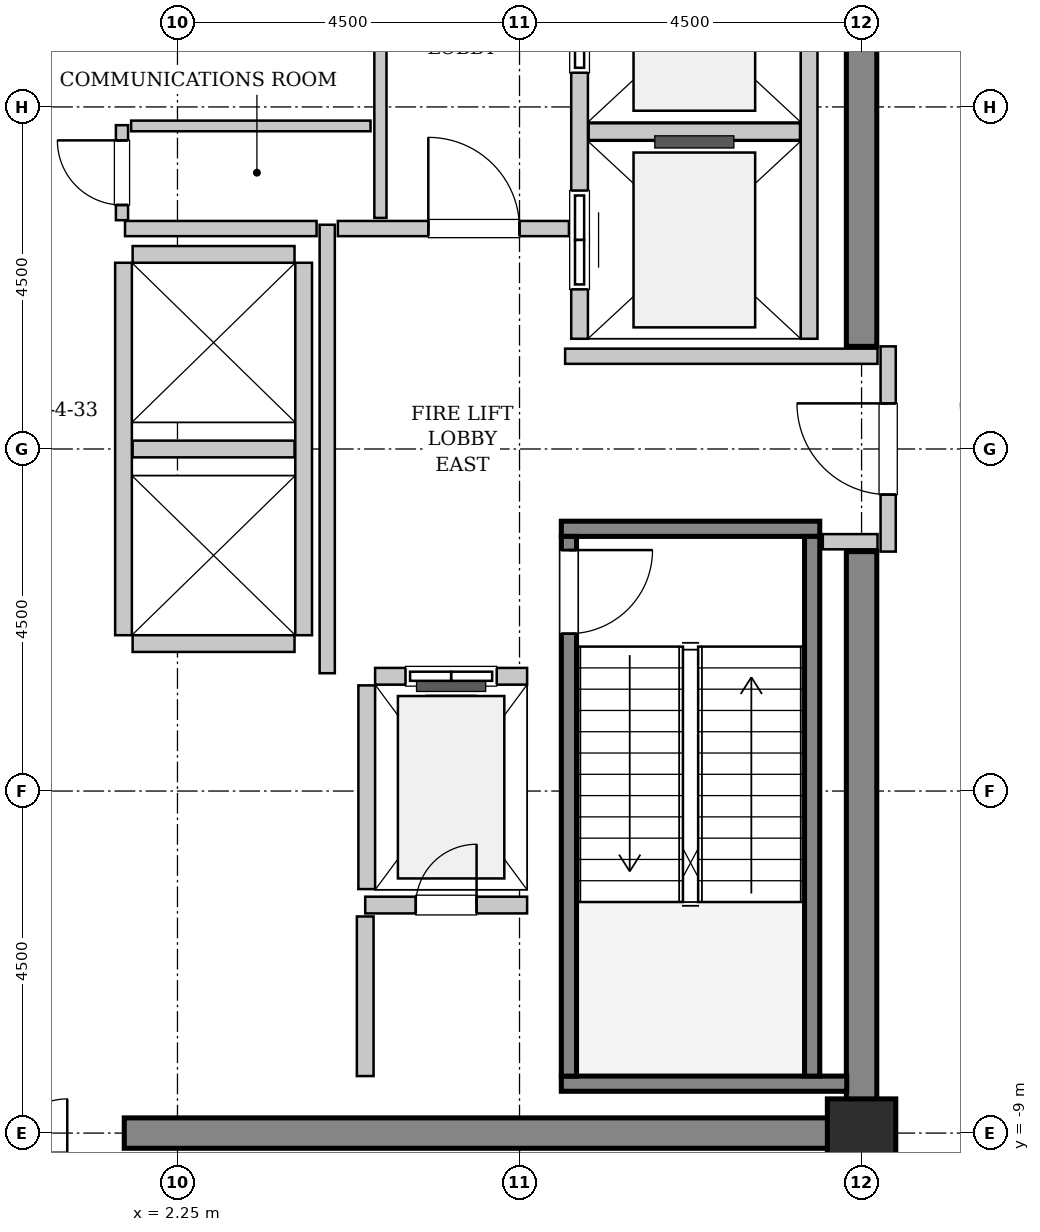
"""IFC4 building model, lengths in metres.
Left out: names, types, materials, properties, quantities, classifications, styles, units other than length and angle.
Written with IfcOpenShell. Run it as: python <this file> out.ifc"""

import sys

from ifc_helpers import new_model, si_unit, direction, frame, frame_2d, origin, origin_2d, place, context, subcontext, project, spatial, rectangle, extrude, source, transform, mapped, element, fill, save


model = new_model("IFC4")
c1 = context("Model", 3, precision=1e-05, world=origin(), true_north=direction((0.0, 1.0)))
c2 = subcontext(c1, "Body", "Model", "MODEL_VIEW")
j1 = project(units=[si_unit("LENGTHUNIT", "METRE"), si_unit("PLANEANGLEUNIT", "RADIAN")], contexts=[c1])
p1 = place(None, origin())
s1 = spatial("IfcSite", under=j1, at=p1, CompositionType="ELEMENT")
p2 = place(p1, origin())
s2 = spatial("IfcBuilding", under=s1, at=p2, CompositionType="ELEMENT")
p3 = place(p2, frame((0.0, 0.0, 358.6)))
s3 = spatial("IfcBuildingStorey", under=s2, at=p3, CompositionType="ELEMENT", Elevation=358.6)
m1 = source(origin(), c2, "Body", "SweptSolid", [
    extrude(rectangle(XDim=9.9, YDim=0.4, at=frame_2d((4.95, 0.0))), origin(), (0.0, 0.0, 1.0), 4.4),
])
p4 = place(p3, frame((1.55, -9.0, 0.0), z_axis=(0.0, 0.0, 1.0), x_axis=(1.0, 0.0, 0.0)))
e1 = element("IfcWall", 1, at=p4, inside=s3, PredefinedType="SHEAR", context=c2, shape_type="MappedRepresentation", body=[
    mapped(m1, transform((0.0, 0.0, 0.0), x_axis=(1.0, 0.0, 0.0), y_axis=(0.0, 1.0, 0.0), z_axis=(0.0, 0.0, 1.0), scale=1.0)),
])
m2 = source(origin(), c2, "Body", "SweptSolid", [
    extrude(rectangle(XDim=7.45, YDim=0.4, at=frame_2d((3.725, 0.0))), origin(), (0.0, 0.0, 1.0), 4.4),
])
for number, where, z_axis, x_axis in (
    (2, (11.25, -8.8, 0.0), (0.0, 0.0, 1.0), (0.0, 1.0, 0.0)),
    (3, (11.25, 1.35, 0.0), (0.0, 0.0, 1.0), (0.0, 1.0, 0.0)),
):
    element("IfcWall", number, at=place(p3, frame(where, z_axis=z_axis, x_axis=x_axis)), inside=s3, PredefinedType="SHEAR", context=c2, shape_type="MappedRepresentation", body=[
        mapped(m2, transform((0.0, 0.0, 0.0), x_axis=(1.0, 0.0, 0.0), y_axis=(0.0, 1.0, 0.0), z_axis=(0.0, 0.0, 1.0), scale=1.0)),
    ])
m3 = source(origin(), c2, "Body", "SweptSolid", [
    extrude(rectangle(XDim=0.9, YDim=0.9, at=origin_2d()), origin(), (0.0, 0.0, 1.0), 4.4),
])
p5 = place(p3, frame((11.25, -9.0, 0.0), z_axis=(0.0, 0.0, 1.0), x_axis=(1.0, 0.0, 0.0)))
e4 = element("IfcColumn", 4, at=p5, inside=s3, PredefinedType="COLUMN", context=c2, shape_type="MappedRepresentation", body=[
    mapped(m3, transform((0.0, 0.0, 0.0), x_axis=(1.0, 0.0, 0.0), y_axis=(0.0, 1.0, 0.0), z_axis=(0.0, 0.0, 1.0), scale=1.0)),
])
m4 = source(origin(), c2, "Body", "SweptSolid", [
    extrude(rectangle(XDim=3.4, YDim=0.2, at=frame_2d((1.7, 0.0))), origin(), (0.0, 0.0, 1.0), 4.4),
])
p6 = place(p3, frame((7.3, -1.05, 0.0), z_axis=(0.0, 0.0, 1.0), x_axis=(1.0, 0.0, 0.0)))
e5 = element("IfcWall", 5, at=p6, inside=s3, PredefinedType="SOLIDWALL", context=c2, shape_type="MappedRepresentation", body=[
    mapped(m4, transform((0.0, 0.0, 0.0), x_axis=(1.0, 0.0, 0.0), y_axis=(0.0, 1.0, 0.0), z_axis=(0.0, 0.0, 1.0), scale=1.0)),
])
m5 = source(origin(), c2, "Body", "SweptSolid", [
    extrude(rectangle(XDim=3.755, YDim=0.2, at=frame_2d((1.877, 0.0))), origin(), (0.0, 0.0, 1.0), 4.4),
])
p7 = place(p3, frame((7.3, -8.35, 0.0), z_axis=(0.0, 0.0, 1.0), x_axis=(1.0, 0.0, 0.0)))
e6 = element("IfcWall", 6, at=p7, inside=s3, PredefinedType="SOLIDWALL", context=c2, shape_type="MappedRepresentation", body=[
    mapped(m5, transform((0.0, 0.0, 0.0), x_axis=(1.0, 0.0, 0.0), y_axis=(0.0, 1.0, 0.0), z_axis=(0.0, 0.0, 1.0), scale=1.0)),
])
m6 = source(origin(), c2, "Body", "SweptSolid", [
    extrude(rectangle(XDim=7.1, YDim=0.2, at=frame_2d((3.55, 0.0))), origin(), (0.0, 0.0, 1.0), 4.4),
])
p8 = place(p3, frame((7.4, -1.15, 0.0), z_axis=(0.0, 0.0, 1.0), x_axis=(0.0, -1.0, 0.0)))
e7 = element("IfcWall", 7, at=p8, inside=s3, PredefinedType="SOLIDWALL", context=c2, shape_type="MappedRepresentation", body=[
    mapped(m6, transform((0.0, 0.0, 0.0), x_axis=(1.0, 0.0, 0.0), y_axis=(0.0, 1.0, 0.0), z_axis=(0.0, 0.0, 1.0), scale=1.0)),
])
p9 = place(p8, frame((0.18, 0.0, 0.0)))
e8 = element("IfcOpeningElement", 8, at=p9, cuts=e7, PredefinedType="OPENING", context=c2, shape_type="SweptSolid", body=[
    extrude(rectangle(XDim=1.1, YDim=2.15, at=frame_2d((0.55, 1.075))), frame((0.0, 0.11, 0.0), z_axis=(0.0, -1.0, 0.0), x_axis=(1.0, 0.0, 0.0)), (0.0, 0.0, 1.0), 0.22),
])
p10 = place(p3, frame((10.6, -1.15, 0.0), z_axis=(0.0, 0.0, 1.0), x_axis=(0.0, -1.0, 0.0)))
e9 = element("IfcWall", 9, at=p10, inside=s3, PredefinedType="SOLIDWALL", context=c2, shape_type="MappedRepresentation", body=[
    mapped(m6, transform((0.0, 0.0, 0.0), x_axis=(1.0, 0.0, 0.0), y_axis=(0.0, 1.0, 0.0), z_axis=(0.0, 0.0, 1.0), scale=1.0)),
])
m7 = source(origin(), c2, "Body", "SweptSolid", [
    extrude(rectangle(XDim=2.0, YDim=0.22, at=frame_2d((1.0, 0.0))), origin(), (0.0, 0.0, 1.0), 4.085),
])
p11 = place(p3, frame((6.85, -2.99, 0.0), z_axis=(0.0, 0.0, 1.0), x_axis=(-1.0, 0.0, 0.0)))
e10 = element("IfcWall", 10, at=p11, inside=s3, PredefinedType="SOLIDWALL", context=c2, shape_type="MappedRepresentation", body=[
    mapped(m7, transform((0.0, 0.0, 0.0), x_axis=(1.0, 0.0, 0.0), y_axis=(0.0, 1.0, 0.0), z_axis=(0.0, 0.0, 1.0), scale=1.0)),
])
p12 = place(p11, frame((0.4, 0.0, 0.0)))
e11 = element("IfcOpeningElement", 11, at=p12, cuts=e10, PredefinedType="OPENING", context=c2, shape_type="SweptSolid", body=[
    extrude(rectangle(XDim=1.2, YDim=2.2, at=frame_2d((0.6, 1.1))), frame((0.0, 0.12, 0.0), z_axis=(0.0, -1.0, 0.0), x_axis=(1.0, 0.0, 0.0)), (0.0, 0.0, 1.0), 0.24),
])
m8 = source(origin(), c2, "Body", "SweptSolid", [
    extrude(rectangle(XDim=2.68, YDim=0.22, at=frame_2d((1.34, 0.0))), origin(), (0.0, 0.0, 1.0), 4.085),
])
p13 = place(p3, frame((4.74, -3.11, 0.0), z_axis=(0.0, 0.0, 1.0), x_axis=(0.0, -1.0, 0.0)))
e12 = element("IfcWall", 12, at=p13, inside=s3, PredefinedType="SOLIDWALL", context=c2, shape_type="MappedRepresentation", body=[
    mapped(m8, transform((0.0, 0.0, 0.0), x_axis=(1.0, 0.0, 0.0), y_axis=(0.0, 1.0, 0.0), z_axis=(0.0, 0.0, 1.0), scale=1.0)),
])
m9 = source(origin(), c2, "Body", "SweptSolid", [
    extrude(rectangle(XDim=5.45, YDim=0.22, at=frame_2d((2.725, 0.0))), origin(), (0.0, 0.0, 1.0), 4.085),
])
p14 = place(p3, frame((7.54, 6.9, 0.0), z_axis=(0.0, 0.0, 1.0), x_axis=(0.0, -1.0, 0.0)))
e13 = element("IfcWall", 13, at=p14, inside=s3, PredefinedType="SOLIDWALL", context=c2, shape_type="MappedRepresentation", body=[
    mapped(m9, transform((0.0, 0.0, 0.0), x_axis=(1.0, 0.0, 0.0), y_axis=(0.0, 1.0, 0.0), z_axis=(0.0, 0.0, 1.0), scale=1.0)),
])
p15 = place(p14, frame((3.5, 0.0, 0.0)))
e14 = element("IfcOpeningElement", 14, at=p15, cuts=e13, PredefinedType="OPENING", context=c2, shape_type="SweptSolid", body=[
    extrude(rectangle(XDim=1.3, YDim=2.3, at=frame_2d((0.65, 1.15))), frame((0.0, 0.12, 0.0), z_axis=(0.0, -1.0, 0.0), x_axis=(1.0, 0.0, 0.0)), (0.0, 0.0, 1.0), 0.24),
])
p16 = place(p14, frame((0.65, 0.0, 0.0)))
e15 = element("IfcOpeningElement", 15, at=p16, cuts=e13, PredefinedType="OPENING", context=c2, shape_type="SweptSolid", body=[
    extrude(rectangle(XDim=1.3, YDim=2.3, at=frame_2d((0.65, 1.15))), frame((0.0, 0.12, 0.0), z_axis=(0.0, -1.0, 0.0), x_axis=(1.0, 0.0, 0.0)), (0.0, 0.0, 1.0), 0.24),
])
p17 = place(p3, frame((10.56, 1.45, 0.0), z_axis=(0.0, 0.0, 1.0), x_axis=(0.0, 1.0, 0.0)))
e16 = element("IfcWall", 16, at=p17, inside=s3, PredefinedType="SOLIDWALL", context=c2, shape_type="MappedRepresentation", body=[
    mapped(m9, transform((0.0, 0.0, 0.0), x_axis=(1.0, 0.0, 0.0), y_axis=(0.0, 1.0, 0.0), z_axis=(0.0, 0.0, 1.0), scale=1.0)),
])
m10 = source(origin(), c2, "Body", "SweptSolid", [
    extrude(rectangle(XDim=2.78, YDim=0.22, at=frame_2d((1.39, 0.0))), origin(), (0.0, 0.0, 1.0), 4.085),
])
p18 = place(p3, frame((7.66, 4.175, 0.0), z_axis=(0.0, 0.0, 1.0), x_axis=(1.0, 0.0, 0.0)))
e17 = element("IfcWall", 17, at=p18, inside=s3, PredefinedType="SOLIDWALL", context=c2, shape_type="MappedRepresentation", body=[
    mapped(m10, transform((0.0, 0.0, 0.0), x_axis=(1.0, 0.0, 0.0), y_axis=(0.0, 1.0, 0.0), z_axis=(0.0, 0.0, 1.0), scale=1.0)),
])
m11 = source(origin(), c2, "Body", "SweptSolid", [
    extrude(rectangle(XDim=4.9, YDim=0.22, at=frame_2d((2.45, 0.0))), origin(), (0.0, 0.0, 1.0), 4.085),
])
for number, where, z_axis, x_axis in (
    (18, (1.54, 2.45, 0.0), (0.0, 0.0, 1.0), (0.0, -1.0, 0.0)),
    (19, (3.91, -2.45, 0.0), (0.0, 0.0, 1.0), (0.0, 1.0, 0.0)),
):
    element("IfcWall", number, at=place(p3, frame(where, z_axis=z_axis, x_axis=x_axis)), inside=s3, PredefinedType="SOLIDWALL", context=c2, shape_type="MappedRepresentation", body=[
        mapped(m11, transform((0.0, 0.0, 0.0), x_axis=(1.0, 0.0, 0.0), y_axis=(0.0, 1.0, 0.0), z_axis=(0.0, 0.0, 1.0), scale=1.0)),
    ])
m12 = source(origin(), c2, "Body", "SweptSolid", [
    extrude(rectangle(XDim=2.13, YDim=0.22, at=frame_2d((1.065, 0.0))), origin(), (0.0, 0.0, 1.0), 4.085),
])
for number, where, z_axis, x_axis in (
    (20, (1.66, -2.56, 0.0), (0.0, 0.0, 1.0), (1.0, 0.0, 0.0)),
    (21, (1.66, 0.0, 0.0), (0.0, 0.0, 1.0), (1.0, 0.0, 0.0)),
    (22, (3.79, 2.56, 0.0), (0.0, 0.0, 1.0), (-1.0, 0.0, 0.0)),
):
    element("IfcWall", number, at=place(p3, frame(where, z_axis=z_axis, x_axis=x_axis)), inside=s3, PredefinedType="SOLIDWALL", context=c2, shape_type="MappedRepresentation", body=[
        mapped(m12, transform((0.0, 0.0, 0.0), x_axis=(1.0, 0.0, 0.0), y_axis=(0.0, 1.0, 0.0), z_axis=(0.0, 0.0, 1.0), scale=1.0)),
    ])
p19 = place(p3, frame((4.72, -6.0, 0.0), z_axis=(0.0, 0.0, 1.0), x_axis=(1.0, 0.0, 0.0)))
e23 = element("IfcWall", 23, at=p19, inside=s3, PredefinedType="SOLIDWALL", context=c2, shape_type="MappedRepresentation", body=[
    mapped(m12, transform((0.0, 0.0, 0.0), x_axis=(1.0, 0.0, 0.0), y_axis=(0.0, 1.0, 0.0), z_axis=(0.0, 0.0, 1.0), scale=1.0)),
])
p20 = place(p19, frame((0.665, 0.0, 0.0)))
e24 = element("IfcOpeningElement", 24, at=p20, cuts=e23, PredefinedType="OPENING", context=c2, shape_type="SweptSolid", body=[
    extrude(rectangle(XDim=0.8, YDim=2.0, at=frame_2d((0.4, 1.0))), frame((0.0, 0.12, 0.0), z_axis=(0.0, -1.0, 0.0), x_axis=(1.0, 0.0, 0.0)), (0.0, 0.0, 1.0), 0.24),
])
m13 = source(origin(), c2, "Body", "SweptSolid", [
    extrude(rectangle(XDim=2.1, YDim=0.22, at=frame_2d((1.05, 0.0))), origin(), (0.0, 0.0, 1.0), 4.085),
])
p21 = place(p3, frame((4.72, -8.25, 0.0), z_axis=(0.0, 0.0, 1.0), x_axis=(0.0, 1.0, 0.0)))
e25 = element("IfcWall", 25, at=p21, inside=s3, PredefinedType="SOLIDWALL", context=c2, shape_type="MappedRepresentation", body=[
    mapped(m13, transform((0.0, 0.0, 0.0), x_axis=(1.0, 0.0, 0.0), y_axis=(0.0, 1.0, 0.0), z_axis=(0.0, 0.0, 1.0), scale=1.0)),
])
m14 = source(origin(), c2, "Body", "SweptSolid", [
    extrude(rectangle(XDim=2.7, YDim=0.2, at=frame_2d((1.35, 0.0))), origin(), (0.0, 0.0, 1.0), 3.175),
])
p22 = place(p3, frame((11.6, -1.35, 0.0), z_axis=(0.0, 0.0, 1.0), x_axis=(0.0, 1.0, 0.0)))
e26 = element("IfcWall", 26, at=p22, inside=s3, PredefinedType="PARTITIONING", context=c2, shape_type="MappedRepresentation", body=[
    mapped(m14, transform((0.0, 0.0, 0.0), x_axis=(1.0, 0.0, 0.0), y_axis=(0.0, 1.0, 0.0), z_axis=(0.0, 0.0, 1.0), scale=1.0)),
])
p23 = place(p22, frame((0.75, 0.0, 0.0)))
e27 = element("IfcOpeningElement", 27, at=p23, cuts=e26, PredefinedType="OPENING", context=c2, shape_type="SweptSolid", body=[
    extrude(rectangle(XDim=1.2, YDim=2.15, at=frame_2d((0.6, 1.075))), frame((0.0, 0.11, 0.0), z_axis=(0.0, -1.0, 0.0), x_axis=(1.0, 0.0, 0.0)), (0.0, 0.0, 1.0), 0.22),
])
m15 = source(origin(), c2, "Body", "SweptSolid", [
    extrude(rectangle(XDim=5.9, YDim=0.2, at=frame_2d((2.95, 0.0))), origin(), (0.0, 0.0, 1.0), 4.085),
])
p24 = place(p3, frame((4.22, -2.95, 0.0), z_axis=(0.0, 0.0, 1.0), x_axis=(0.0, 1.0, 0.0)))
e28 = element("IfcWall", 28, at=p24, inside=s3, PredefinedType="PARTITIONING", context=c2, shape_type="MappedRepresentation", body=[
    mapped(m15, transform((0.0, 0.0, 0.0), x_axis=(1.0, 0.0, 0.0), y_axis=(0.0, 1.0, 0.0), z_axis=(0.0, 0.0, 1.0), scale=1.0)),
])
m16 = source(origin(), c2, "Body", "SweptSolid", [
    extrude(rectangle(XDim=2.52, YDim=0.2, at=frame_2d((1.26, 0.0))), origin(), (0.0, 0.0, 1.0), 4.085),
])
p25 = place(p3, frame((1.56, 2.9, 0.0), z_axis=(0.0, 0.0, 1.0), x_axis=(1.0, 0.0, 0.0)))
e29 = element("IfcWall", 29, at=p25, inside=s3, PredefinedType="PARTITIONING", context=c2, shape_type="MappedRepresentation", body=[
    mapped(m16, transform((0.0, 0.0, 0.0), x_axis=(1.0, 0.0, 0.0), y_axis=(0.0, 1.0, 0.0), z_axis=(0.0, 0.0, 1.0), scale=1.0)),
])
m17 = source(origin(), c2, "Body", "SweptSolid", [
    extrude(rectangle(XDim=3.04, YDim=0.2, at=frame_2d((1.52, 0.0))), origin(), (0.0, 0.0, 1.0), 4.085),
])
p26 = place(p3, frame((4.36, 2.9, 0.0), z_axis=(0.0, 0.0, 1.0), x_axis=(1.0, 0.0, 0.0)))
e30 = element("IfcWall", 30, at=p26, inside=s3, PredefinedType="PARTITIONING", context=c2, shape_type="MappedRepresentation", body=[
    mapped(m17, transform((0.0, 0.0, 0.0), x_axis=(1.0, 0.0, 0.0), y_axis=(0.0, 1.0, 0.0), z_axis=(0.0, 0.0, 1.0), scale=1.0)),
])
p27 = place(p26, frame((1.19, 0.0, 0.0)))
e31 = element("IfcOpeningElement", 31, at=p27, cuts=e30, PredefinedType="OPENING", context=c2, shape_type="SweptSolid", body=[
    extrude(rectangle(XDim=1.2, YDim=2.15, at=frame_2d((0.6, 1.075))), frame((0.0, 0.11, 0.0), z_axis=(0.0, -1.0, 0.0), x_axis=(1.0, 0.0, 0.0)), (0.0, 0.0, 1.0), 0.22),
])
m18 = source(origin(), c2, "Body", "SweptSolid", [
    extrude(rectangle(XDim=4.11, YDim=0.2, at=frame_2d((2.055, 0.0))), origin(), (0.0, 0.0, 1.0), 4.085),
])
p28 = place(p3, frame((7.35, 1.22, 0.0), z_axis=(0.0, 0.0, 1.0), x_axis=(1.0, 0.0, 0.0)))
e32 = element("IfcWall", 32, at=p28, inside=s3, PredefinedType="PARTITIONING", context=c2, shape_type="MappedRepresentation", body=[
    mapped(m18, transform((0.0, 0.0, 0.0), x_axis=(1.0, 0.0, 0.0), y_axis=(0.0, 1.0, 0.0), z_axis=(0.0, 0.0, 1.0), scale=1.0)),
])
m19 = source(origin(), c2, "Body", "SweptSolid", [
    extrude(rectangle(XDim=0.72, YDim=0.2, at=frame_2d((0.36, 0.0))), origin(), (0.0, 0.0, 1.0), 4.085),
])
p29 = place(p3, frame((10.74, -1.22, 0.0), z_axis=(0.0, 0.0, 1.0), x_axis=(1.0, 0.0, 0.0)))
e33 = element("IfcWall", 33, at=p29, inside=s3, PredefinedType="PARTITIONING", context=c2, shape_type="MappedRepresentation", body=[
    mapped(m19, transform((0.0, 0.0, 0.0), x_axis=(1.0, 0.0, 0.0), y_axis=(0.0, 1.0, 0.0), z_axis=(0.0, 0.0, 1.0), scale=1.0)),
])
m20 = source(origin(), c2, "Body", "SweptSolid", [
    extrude(rectangle(XDim=4.01, YDim=0.16, at=frame_2d((2.005, 0.0))), origin(), (0.0, 0.0, 1.0), 4.085),
])
p30 = place(p3, frame((4.92, 3.04, 0.0), z_axis=(0.0, 0.0, 1.0), x_axis=(0.0, 1.0, 0.0)))
e34 = element("IfcWall", 34, at=p30, inside=s3, PredefinedType="PARTITIONING", context=c2, shape_type="MappedRepresentation", body=[
    mapped(m20, transform((0.0, 0.0, 0.0), x_axis=(1.0, 0.0, 0.0), y_axis=(0.0, 1.0, 0.0), z_axis=(0.0, 0.0, 1.0), scale=1.0)),
])
m21 = source(origin(), c2, "Body", "SweptSolid", [
    extrude(rectangle(XDim=1.25, YDim=0.16, at=frame_2d((0.625, 0.0))), origin(), (0.0, 0.0, 1.0), 4.085),
])
p31 = place(p3, frame((1.52, 3.01, 0.0), z_axis=(0.0, 0.0, 1.0), x_axis=(0.0, 1.0, 0.0)))
e35 = element("IfcWall", 35, at=p31, inside=s3, PredefinedType="PARTITIONING", context=c2, shape_type="MappedRepresentation", body=[
    mapped(m21, transform((0.0, 0.0, 0.0), x_axis=(1.0, 0.0, 0.0), y_axis=(0.0, 1.0, 0.0), z_axis=(0.0, 0.0, 1.0), scale=1.0)),
])
p32 = place(p31, frame((0.2, 0.0, 0.0)))
e36 = element("IfcOpeningElement", 36, at=p32, cuts=e35, PredefinedType="OPENING", context=c2, shape_type="SweptSolid", body=[
    extrude(rectangle(XDim=0.85, YDim=2.1, at=frame_2d((0.425, 1.05))), frame((0.0, 0.09, 0.0), z_axis=(0.0, -1.0, 0.0), x_axis=(1.0, 0.0, 0.0)), (0.0, 0.0, 1.0), 0.18),
])
m22 = source(origin(), c2, "Body", "SweptSolid", [
    extrude(rectangle(XDim=3.15, YDim=0.14, at=frame_2d((1.575, 0.0))), origin(), (0.0, 0.0, 1.0), 4.085),
])
p33 = place(p3, frame((1.64, 4.25, 0.0), z_axis=(0.0, 0.0, 1.0), x_axis=(1.0, 0.0, 0.0)))
e37 = element("IfcWall", 37, at=p33, inside=s3, PredefinedType="PARTITIONING", context=c2, shape_type="MappedRepresentation", body=[
    mapped(m22, transform((0.0, 0.0, 0.0), x_axis=(1.0, 0.0, 0.0), y_axis=(0.0, 1.0, 0.0), z_axis=(0.0, 0.0, 1.0), scale=1.0)),
])
m23 = source(origin(), c2, "Body", "SweptSolid", [
    extrude(rectangle(XDim=1.1, YDim=2.15, at=frame_2d((0.55, 1.075))), frame((0.0, 0.025, 0.0), z_axis=(0.0, -1.0, 0.0), x_axis=(1.0, 0.0, 0.0)), (0.0, 0.0, 1.0), 0.05),
])
p34 = place(p9, origin())
e38 = element("IfcDoor", 38, at=p34, inside=s3, OperationType="SINGLE_SWING_LEFT", PredefinedType="DOOR", context=c2, shape_type="MappedRepresentation", body=[
    mapped(m23, transform((0.0, 0.0, 0.0), x_axis=(1.0, 0.0, 0.0), y_axis=(0.0, 1.0, 0.0), z_axis=(0.0, 0.0, 1.0), scale=1.0)),
])
fill(e8, e38)
m24 = source(origin(), c2, "Body", "SweptSolid", [
    extrude(rectangle(XDim=1.2, YDim=2.2, at=frame_2d((0.6, 1.1))), frame((0.0, 0.025, 0.0), z_axis=(0.0, -1.0, 0.0), x_axis=(1.0, 0.0, 0.0)), (0.0, 0.0, 1.0), 0.05),
])
p35 = place(p12, origin())
e39 = element("IfcDoor", 39, at=p35, inside=s3, OperationType="SLIDING_TO_LEFT", PredefinedType="DOOR", context=c2, shape_type="MappedRepresentation", body=[
    mapped(m24, transform((0.0, 0.0, 0.0), x_axis=(1.0, 0.0, 0.0), y_axis=(0.0, 1.0, 0.0), z_axis=(0.0, 0.0, 1.0), scale=1.0)),
])
fill(e11, e39)
m25 = source(origin(), c2, "Body", "SweptSolid", [
    extrude(rectangle(XDim=1.3, YDim=2.3, at=frame_2d((0.65, 1.15))), frame((0.0, 0.025, 0.0), z_axis=(0.0, -1.0, 0.0), x_axis=(1.0, 0.0, 0.0)), (0.0, 0.0, 1.0), 0.05),
])
p36 = place(p15, origin())
e40 = element("IfcDoor", 40, at=p36, inside=s3, OperationType="SLIDING_TO_RIGHT", PredefinedType="DOOR", context=c2, shape_type="MappedRepresentation", body=[
    mapped(m25, transform((0.0, 0.0, 0.0), x_axis=(1.0, 0.0, 0.0), y_axis=(0.0, 1.0, 0.0), z_axis=(0.0, 0.0, 1.0), scale=1.0)),
])
fill(e14, e40)
p37 = place(p16, origin())
e41 = element("IfcDoor", 41, at=p37, inside=s3, OperationType="SLIDING_TO_RIGHT", PredefinedType="DOOR", context=c2, shape_type="MappedRepresentation", body=[
    mapped(m25, transform((0.0, 0.0, 0.0), x_axis=(1.0, 0.0, 0.0), y_axis=(0.0, 1.0, 0.0), z_axis=(0.0, 0.0, 1.0), scale=1.0)),
])
fill(e15, e41)
m26 = source(origin(), c2, "Body", "SweptSolid", [
    extrude(rectangle(XDim=0.8, YDim=2.0, at=frame_2d((0.4, 1.0))), frame((0.0, 0.025, 0.0), z_axis=(0.0, -1.0, 0.0), x_axis=(1.0, 0.0, 0.0)), (0.0, 0.0, 1.0), 0.05),
])
p38 = place(p20, origin())
e42 = element("IfcDoor", 42, at=p38, inside=s3, OperationType="SINGLE_SWING_RIGHT", PredefinedType="TRAPDOOR", context=c2, shape_type="MappedRepresentation", body=[
    mapped(m26, transform((0.0, 0.0, 0.0), x_axis=(1.0, 0.0, 0.0), y_axis=(0.0, 1.0, 0.0), z_axis=(0.0, 0.0, 1.0), scale=1.0)),
])
fill(e24, e42)
m27 = source(origin(), c2, "Body", "SweptSolid", [
    extrude(rectangle(XDim=1.2, YDim=2.15, at=frame_2d((0.6, 1.075))), frame((0.0, 0.025, 0.0), z_axis=(0.0, -1.0, 0.0), x_axis=(1.0, 0.0, 0.0)), (0.0, 0.0, 1.0), 0.05),
])
p39 = place(p23, origin())
e43 = element("IfcDoor", 43, at=p39, inside=s3, OperationType="SINGLE_SWING_RIGHT", PredefinedType="DOOR", context=c2, shape_type="MappedRepresentation", body=[
    mapped(m27, transform((0.0, 0.0, 0.0), x_axis=(1.0, 0.0, 0.0), y_axis=(0.0, 1.0, 0.0), z_axis=(0.0, 0.0, 1.0), scale=1.0)),
])
fill(e27, e43)
p40 = place(p27, origin())
e44 = element("IfcDoor", 44, at=p40, inside=s3, OperationType="SINGLE_SWING_LEFT", PredefinedType="DOOR", context=c2, shape_type="MappedRepresentation", body=[
    mapped(m27, transform((0.0, 0.0, 0.0), x_axis=(1.0, 0.0, 0.0), y_axis=(0.0, 1.0, 0.0), z_axis=(0.0, 0.0, 1.0), scale=1.0)),
])
fill(e31, e44)
m28 = source(origin(), c2, "Body", "SweptSolid", [
    extrude(rectangle(XDim=0.85, YDim=2.1, at=frame_2d((0.425, 1.05))), frame((0.0, 0.025, 0.0), z_axis=(0.0, -1.0, 0.0), x_axis=(1.0, 0.0, 0.0)), (0.0, 0.0, 1.0), 0.05),
])
p41 = place(p32, origin())
e45 = element("IfcDoor", 45, at=p41, inside=s3, OperationType="SINGLE_SWING_RIGHT", PredefinedType="DOOR", context=c2, shape_type="MappedRepresentation", body=[
    mapped(m28, transform((0.0, 0.0, 0.0), x_axis=(1.0, 0.0, 0.0), y_axis=(0.0, 1.0, 0.0), z_axis=(0.0, 0.0, 1.0), scale=1.0)),
])
fill(e36, e45)
save(model, sys.argv[1])
